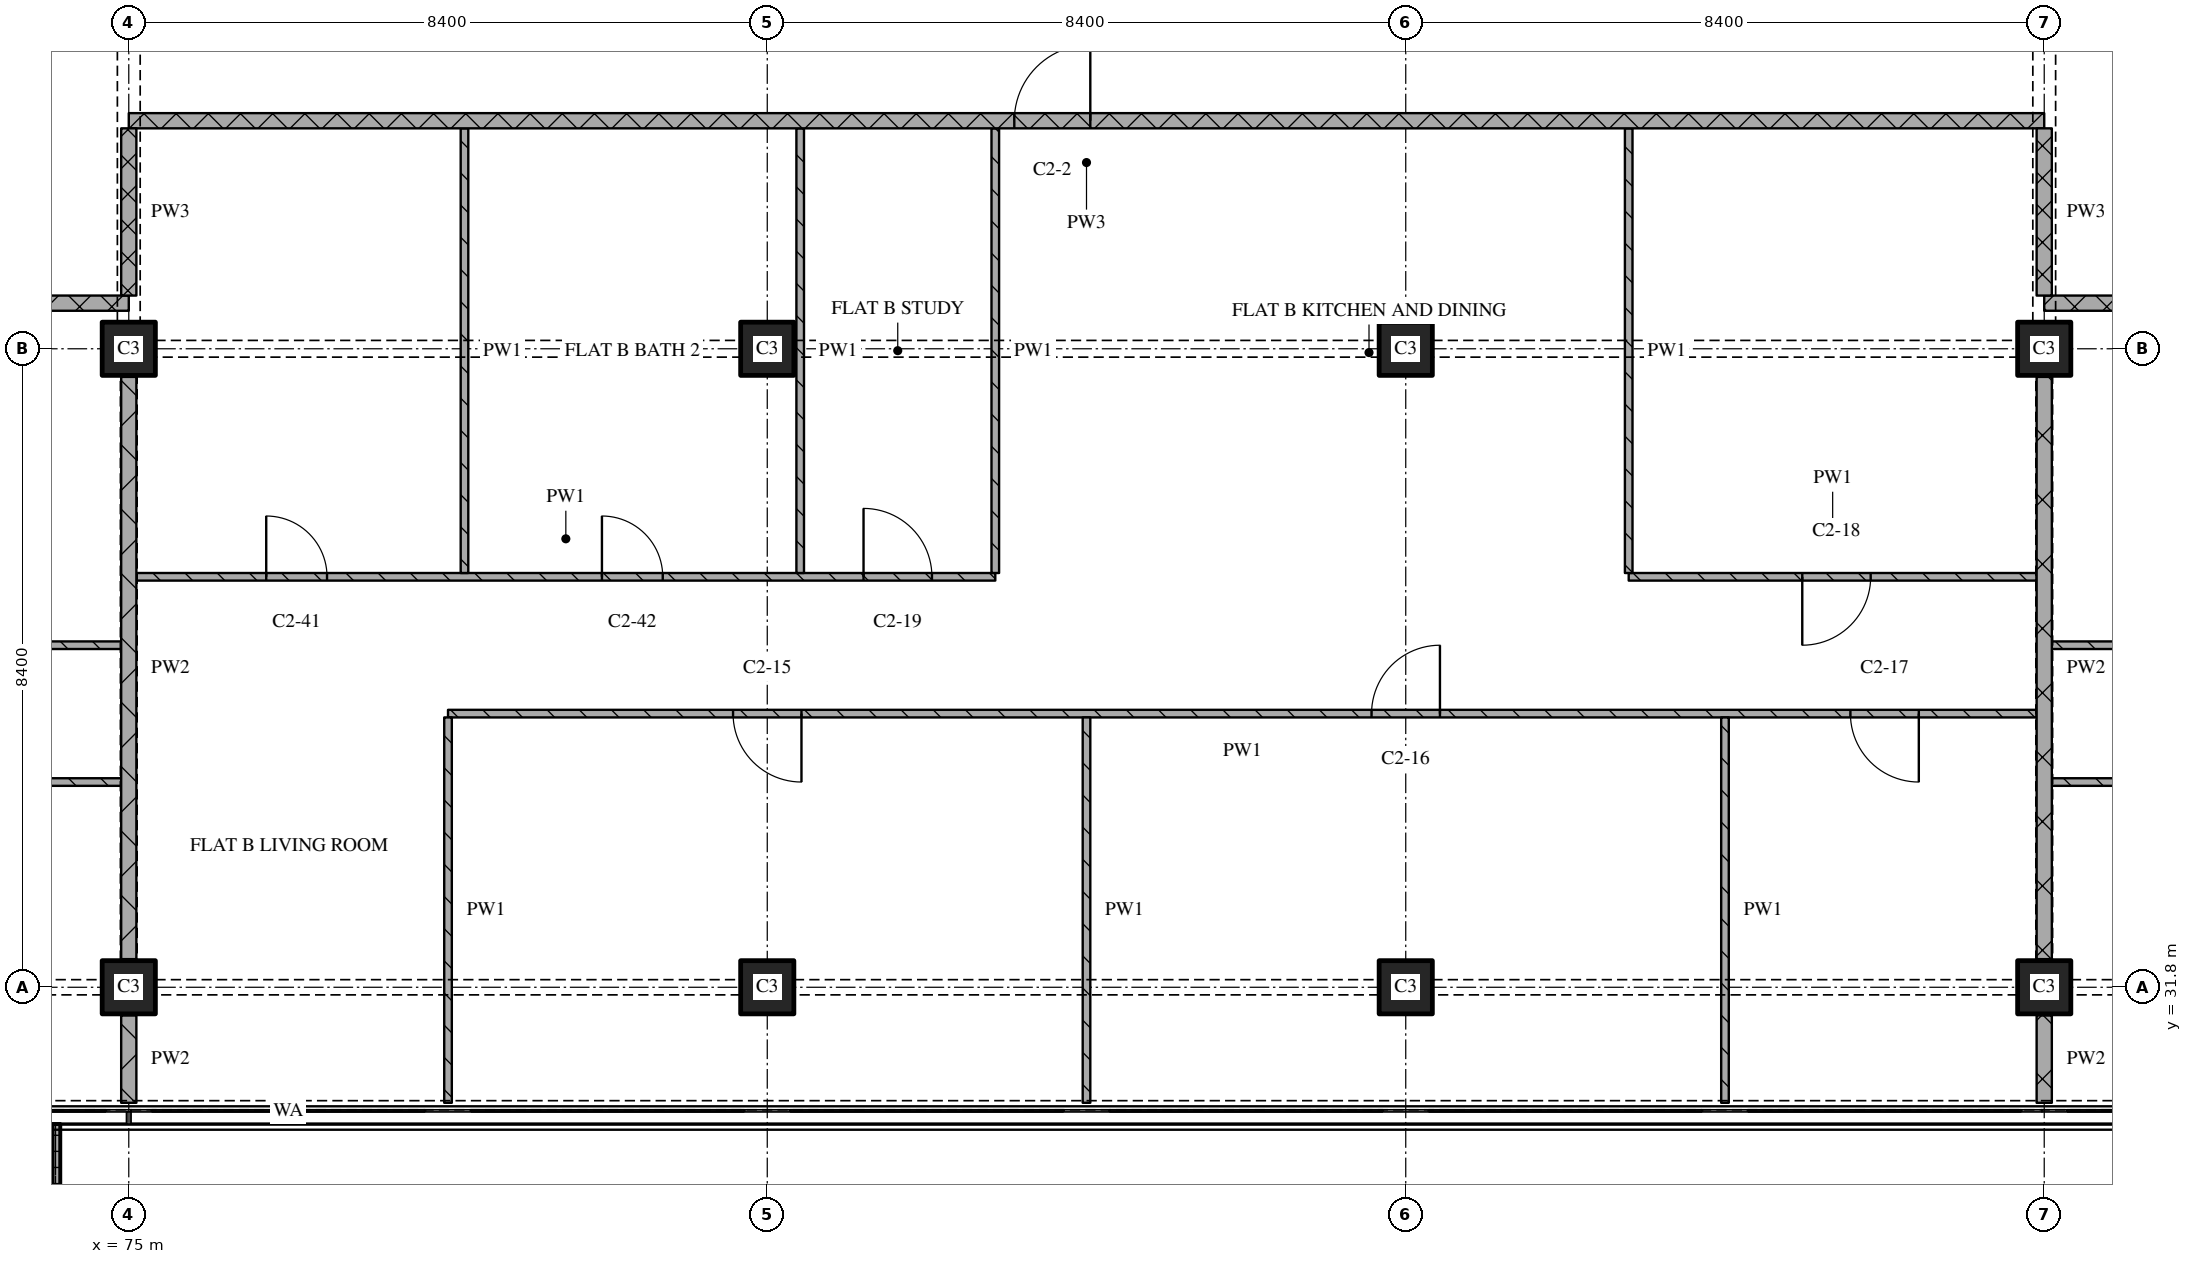
"""IFC4 building model, lengths in metres.
Left out: names, types, materials, properties, quantities, classifications, styles, units other than length and angle.
Written with IfcOpenShell. Run it as: python <this file> out.ifc"""

import sys

from ifc_helpers import new_model, si_unit, direction, frame, frame_2d, origin, origin_2d, place, context, subcontext, project, spatial, polyline, rectangle, outline, extrude, element, fill, save


model = new_model("IFC4")
c1 = context("Model", 3, precision=1e-05, world=origin(), true_north=direction((0.0, 1.0)))
c2 = subcontext(c1, "Body", "Model", "MODEL_VIEW")
j1 = project(units=[si_unit("LENGTHUNIT", "METRE"), si_unit("PLANEANGLEUNIT", "RADIAN")], contexts=[c1])
p1 = place(None, origin())
s1 = spatial("IfcSite", under=j1, at=p1, CompositionType="ELEMENT")
p2 = place(p1, origin())
s2 = spatial("IfcBuilding", under=s1, at=p2, CompositionType="ELEMENT")
p3 = place(p2, frame((0.0, 0.0, 161.85)))
s3 = spatial("IfcBuildingStorey", under=s2, at=p3, CompositionType="ELEMENT", Elevation=161.85)
for number, where, z_axis, x_axis in (
    (1, (75.0, 31.8, 0.0), (0.0, 0.0, 1.0), (1.0, 0.0, 0.0)),
    (2, (75.0, 40.2, 0.0), (0.0, 0.0, 1.0), (1.0, 0.0, 0.0)),
    (3, (83.4, 31.8, 0.0), (0.0, 0.0, 1.0), (1.0, 0.0, 0.0)),
    (4, (83.4, 40.2, 0.0), (0.0, 0.0, 1.0), (1.0, 0.0, 0.0)),
    (5, (91.8, 31.8, 0.0), (0.0, 0.0, 1.0), (1.0, 0.0, 0.0)),
    (6, (91.8, 40.2, 0.0), (0.0, 0.0, 1.0), (1.0, 0.0, 0.0)),
    (7, (100.2, 31.8, 0.0), (0.0, 0.0, 1.0), (1.0, 0.0, 0.0)),
    (8, (100.2, 40.2, 0.0), (0.0, 0.0, 1.0), (1.0, 0.0, 0.0)),
):
    element("IfcColumn", number, at=place(p3, frame(where, z_axis=z_axis, x_axis=x_axis)), inside=s3, PredefinedType="COLUMN", context=c2, shape_type="SweptSolid", body=[
        extrude(rectangle(XDim=0.7, YDim=0.7, at=origin_2d()), origin(), (0.0, 0.0, 1.0), 3.6),
    ])
p4 = place(p3, origin())
e9 = element("IfcWall", 9, at=p4, inside=s3, PredefinedType="SOLIDWALL", context=c2, shape_type="SweptSolid", body=[
    extrude(outline(polyline([(71.7, 30.0), (71.8, 30.0), (71.8, 28.5), (74.0, 28.5), (74.0, 30.0), (74.1, 30.0), (74.1, 28.4), (71.7, 28.4), (71.7, 30.0)])), origin(), (0.0, 0.0, 1.0), 1.0),
])
p5 = place(p3, frame((74.9, 34.5, 0.0), z_axis=(0.0, 0.0, 1.0), x_axis=(-1.0, 0.0, 0.0)))
e10 = element("IfcWall", 10, at=p5, inside=s3, PredefinedType="PARTITIONING", context=c2, shape_type="SweptSolid", body=[
    extrude(rectangle(XDim=16.7, YDim=0.1, at=frame_2d((8.35, 0.0))), origin(), (0.0, 0.0, 1.0), 3.32),
])
p6 = place(p5, frame((1.55, 0.0, 0.0)))
e11 = element("IfcOpeningElement", 11, at=p6, cuts=e10, PredefinedType="OPENING", context=c2, shape_type="SweptSolid", body=[
    extrude(rectangle(XDim=0.9, YDim=2.1, at=frame_2d((0.45, 1.05))), frame((0.0, 0.06, 0.0), z_axis=(0.0, -1.0, 0.0), x_axis=(1.0, 0.0, 0.0)), (0.0, 0.0, 1.0), 0.12),
])
p7 = place(p5, frame((7.85, 0.0, 0.0)))
e12 = element("IfcOpeningElement", 12, at=p7, cuts=e10, PredefinedType="OPENING", context=c2, shape_type="SweptSolid", body=[
    extrude(rectangle(XDim=0.9, YDim=2.1, at=frame_2d((0.45, 1.05))), frame((0.0, 0.06, 0.0), z_axis=(0.0, -1.0, 0.0), x_axis=(1.0, 0.0, 0.0)), (0.0, 0.0, 1.0), 0.12),
])
p8 = place(p5, frame((14.15, 0.0, 0.0)))
e13 = element("IfcOpeningElement", 13, at=p8, cuts=e10, PredefinedType="OPENING", context=c2, shape_type="SweptSolid", body=[
    extrude(rectangle(XDim=0.9, YDim=2.1, at=frame_2d((0.45, 1.05))), frame((0.0, 0.06, 0.0), z_axis=(0.0, -1.0, 0.0), x_axis=(1.0, 0.0, 0.0)), (0.0, 0.0, 1.0), 0.12),
])
p9 = place(p3, frame((117.0, 34.5, 0.0), z_axis=(0.0, 0.0, 1.0), x_axis=(-1.0, 0.0, 0.0)))
e14 = element("IfcWall", 14, at=p9, inside=s3, PredefinedType="PARTITIONING", context=c2, shape_type="SweptSolid", body=[
    extrude(rectangle(XDim=16.7, YDim=0.1, at=frame_2d((8.35, 0.0))), origin(), (0.0, 0.0, 1.0), 3.32),
])
p10 = place(p9, frame((12.15, 0.0, 0.0)))
e15 = element("IfcOpeningElement", 15, at=p10, cuts=e14, PredefinedType="OPENING", context=c2, shape_type="SweptSolid", body=[
    extrude(rectangle(XDim=0.9, YDim=2.1, at=frame_2d((0.45, 1.05))), frame((0.0, 0.06, 0.0), z_axis=(0.0, -1.0, 0.0), x_axis=(1.0, 0.0, 0.0)), (0.0, 0.0, 1.0), 0.12),
])
p11 = place(p3, frame((100.1, 35.4, 0.0), z_axis=(0.0, 0.0, 1.0), x_axis=(-1.0, 0.0, 0.0)))
e16 = element("IfcWall", 16, at=p11, inside=s3, PredefinedType="PARTITIONING", context=c2, shape_type="SweptSolid", body=[
    extrude(rectangle(XDim=20.9, YDim=0.1, at=frame_2d((10.45, 0.0))), origin(), (0.0, 0.0, 1.0), 3.32),
])
p12 = place(p11, frame((1.55, 0.0, 0.0)))
e17 = element("IfcOpeningElement", 17, at=p12, cuts=e16, PredefinedType="OPENING", context=c2, shape_type="SweptSolid", body=[
    extrude(rectangle(XDim=0.9, YDim=2.1, at=frame_2d((0.45, 1.05))), frame((0.0, 0.06, 0.0), z_axis=(0.0, -1.0, 0.0), x_axis=(1.0, 0.0, 0.0)), (0.0, 0.0, 1.0), 0.12),
])
p13 = place(p11, frame((7.85, 0.0, 0.0)))
e18 = element("IfcOpeningElement", 18, at=p13, cuts=e16, PredefinedType="OPENING", context=c2, shape_type="SweptSolid", body=[
    extrude(rectangle(XDim=0.9, YDim=2.1, at=frame_2d((0.45, 1.05))), frame((0.0, 0.06, 0.0), z_axis=(0.0, -1.0, 0.0), x_axis=(1.0, 0.0, 0.0)), (0.0, 0.0, 1.0), 0.12),
])
p14 = place(p11, frame((16.25, 0.0, 0.0)))
e19 = element("IfcOpeningElement", 19, at=p14, cuts=e16, PredefinedType="OPENING", context=c2, shape_type="SweptSolid", body=[
    extrude(rectangle(XDim=0.9, YDim=2.1, at=frame_2d((0.45, 1.05))), frame((0.0, 0.06, 0.0), z_axis=(0.0, -1.0, 0.0), x_axis=(1.0, 0.0, 0.0)), (0.0, 0.0, 1.0), 0.12),
])
p15 = place(p3, frame((66.3, 36.3, 0.0), z_axis=(0.0, 0.0, 1.0), x_axis=(1.0, 0.0, 0.0)))
e20 = element("IfcWall", 20, at=p15, inside=s3, PredefinedType="PARTITIONING", context=c2, shape_type="SweptSolid", body=[
    extrude(rectangle(XDim=8.6, YDim=0.1, at=frame_2d((4.3, 0.0))), origin(), (0.0, 0.0, 1.0), 3.32),
])
p16 = place(p15, frame((6.2, 0.0, 0.0)))
e21 = element("IfcOpeningElement", 21, at=p16, cuts=e20, PredefinedType="OPENING", context=c2, shape_type="SweptSolid", body=[
    extrude(rectangle(XDim=0.8, YDim=2.1, at=frame_2d((0.4, 1.05))), frame((0.0, 0.06, 0.0), z_axis=(0.0, -1.0, 0.0), x_axis=(1.0, 0.0, 0.0)), (0.0, 0.0, 1.0), 0.12),
])
p17 = place(p3, frame((100.3, 36.3, 0.0), z_axis=(0.0, 0.0, 1.0), x_axis=(1.0, 0.0, 0.0)))
e22 = element("IfcWall", 22, at=p17, inside=s3, PredefinedType="PARTITIONING", context=c2, shape_type="SweptSolid", body=[
    extrude(rectangle(XDim=12.2, YDim=0.1, at=frame_2d((6.1, 0.0))), origin(), (0.0, 0.0, 1.0), 3.32),
])
p18 = place(p17, frame((1.75, 0.0, 0.0)))
e23 = element("IfcOpeningElement", 23, at=p18, cuts=e22, PredefinedType="OPENING", context=c2, shape_type="SweptSolid", body=[
    extrude(rectangle(XDim=0.8, YDim=2.1, at=frame_2d((0.4, 1.05))), frame((0.0, 0.06, 0.0), z_axis=(0.0, -1.0, 0.0), x_axis=(1.0, 0.0, 0.0)), (0.0, 0.0, 1.0), 0.12),
])
p19 = place(p17, frame((6.25, 0.0, 0.0)))
e24 = element("IfcOpeningElement", 24, at=p19, cuts=e22, PredefinedType="OPENING", context=c2, shape_type="SweptSolid", body=[
    extrude(rectangle(XDim=0.8, YDim=2.1, at=frame_2d((0.4, 1.05))), frame((0.0, 0.06, 0.0), z_axis=(0.0, -1.0, 0.0), x_axis=(1.0, 0.0, 0.0)), (0.0, 0.0, 1.0), 0.12),
])
p20 = place(p3, frame((75.1, 37.2, 0.0), z_axis=(0.0, 0.0, 1.0), x_axis=(1.0, 0.0, 0.0)))
e25 = element("IfcWall", 25, at=p20, inside=s3, PredefinedType="PARTITIONING", context=c2, shape_type="SweptSolid", body=[
    extrude(rectangle(XDim=11.3, YDim=0.1, at=frame_2d((5.65, 0.0))), origin(), (0.0, 0.0, 1.0), 3.32),
])
p21 = place(p20, frame((1.708, 0.0, 0.0)))
e26 = element("IfcOpeningElement", 26, at=p21, cuts=e25, PredefinedType="OPENING", context=c2, shape_type="SweptSolid", body=[
    extrude(rectangle(XDim=0.8, YDim=2.1, at=frame_2d((0.4, 1.05))), frame((0.0, 0.06, 0.0), z_axis=(0.0, -1.0, 0.0), x_axis=(1.0, 0.0, 0.0)), (0.0, 0.0, 1.0), 0.12),
])
p22 = place(p20, frame((6.125, 0.0, 0.0)))
e27 = element("IfcOpeningElement", 27, at=p22, cuts=e25, PredefinedType="OPENING", context=c2, shape_type="SweptSolid", body=[
    extrude(rectangle(XDim=0.8, YDim=2.1, at=frame_2d((0.4, 1.05))), frame((0.0, 0.06, 0.0), z_axis=(0.0, -1.0, 0.0), x_axis=(1.0, 0.0, 0.0)), (0.0, 0.0, 1.0), 0.12),
])
p23 = place(p20, frame((9.567, 0.0, 0.0)))
e28 = element("IfcOpeningElement", 28, at=p23, cuts=e25, PredefinedType="OPENING", context=c2, shape_type="SweptSolid", body=[
    extrude(rectangle(XDim=0.9, YDim=2.1, at=frame_2d((0.45, 1.05))), frame((0.0, 0.06, 0.0), z_axis=(0.0, -1.0, 0.0), x_axis=(1.0, 0.0, 0.0)), (0.0, 0.0, 1.0), 0.12),
])
p24 = place(p3, frame((94.733, 37.2, 0.0), z_axis=(0.0, 0.0, 1.0), x_axis=(1.0, 0.0, 0.0)))
e29 = element("IfcWall", 29, at=p24, inside=s3, PredefinedType="PARTITIONING", context=c2, shape_type="SweptSolid", body=[
    extrude(rectangle(XDim=5.367, YDim=0.1, at=frame_2d((2.683, 0.0))), origin(), (0.0, 0.0, 1.0), 3.32),
])
p25 = place(p24, frame((2.283, 0.0, 0.0)))
e30 = element("IfcOpeningElement", 30, at=p25, cuts=e29, PredefinedType="OPENING", context=c2, shape_type="SweptSolid", body=[
    extrude(rectangle(XDim=0.9, YDim=2.1, at=frame_2d((0.45, 1.05))), frame((0.0, 0.06, 0.0), z_axis=(0.0, -1.0, 0.0), x_axis=(1.0, 0.0, 0.0)), (0.0, 0.0, 1.0), 0.12),
])
p26 = place(p3, frame((75.0, 40.8, 0.0), z_axis=(0.0, 0.0, 1.0), x_axis=(-1.0, 0.0, 0.0)))
e31 = element("IfcWall", 31, at=p26, inside=s3, PredefinedType="PARTITIONING", context=c2, shape_type="SweptSolid", body=[
    extrude(rectangle(XDim=24.28, YDim=0.2, at=frame_2d((12.14, 0.0))), origin(), (0.0, 0.0, 1.0), 3.32),
])
p27 = place(p26, frame((8.95, 0.0, 0.0)))
e32 = element("IfcOpeningElement", 32, at=p27, cuts=e31, PredefinedType="OPENING", context=c2, shape_type="SweptSolid", body=[
    extrude(rectangle(XDim=1.0, YDim=2.1, at=frame_2d((0.5, 1.05))), frame((0.0, 0.11, 0.0), z_axis=(0.0, -1.0, 0.0), x_axis=(1.0, 0.0, 0.0)), (0.0, 0.0, 1.0), 0.22),
])
p28 = place(p3, frame((124.48, 40.8, 0.0), z_axis=(0.0, 0.0, 1.0), x_axis=(-1.0, 0.0, 0.0)))
e33 = element("IfcWall", 33, at=p28, inside=s3, PredefinedType="PARTITIONING", context=c2, shape_type="SweptSolid", body=[
    extrude(rectangle(XDim=24.28, YDim=0.2, at=frame_2d((12.14, 0.0))), origin(), (0.0, 0.0, 1.0), 3.32),
])
p29 = place(p28, frame((10.73, 0.0, 0.0)))
e34 = element("IfcOpeningElement", 34, at=p29, cuts=e33, PredefinedType="OPENING", context=c2, shape_type="SweptSolid", body=[
    extrude(rectangle(XDim=1.0, YDim=2.1, at=frame_2d((0.5, 1.05))), frame((0.0, 0.11, 0.0), z_axis=(0.0, -1.0, 0.0), x_axis=(1.0, 0.0, 0.0)), (0.0, 0.0, 1.0), 0.22),
])
p30 = place(p3, frame((100.2, 43.2, 0.0), z_axis=(0.0, 0.0, 1.0), x_axis=(-1.0, 0.0, 0.0)))
e35 = element("IfcWall", 35, at=p30, inside=s3, PredefinedType="PARTITIONING", context=c2, shape_type="SweptSolid", body=[
    extrude(rectangle(XDim=25.2, YDim=0.2, at=frame_2d((12.6, 0.0))), origin(), (0.0, 0.0, 1.0), 3.32),
])
p31 = place(p30, frame((12.55, 0.0, 0.0)))
e36 = element("IfcOpeningElement", 36, at=p31, cuts=e35, PredefinedType="OPENING", context=c2, shape_type="SweptSolid", body=[
    extrude(rectangle(XDim=1.0, YDim=2.1, at=frame_2d((0.5, 1.05))), frame((0.0, 0.11, 0.0), z_axis=(0.0, -1.0, 0.0), x_axis=(1.0, 0.0, 0.0)), (0.0, 0.0, 1.0), 0.22),
])
p32 = place(p3, frame((75.0, 43.1, 0.0), z_axis=(0.0, 0.0, 1.0), x_axis=(0.0, -1.0, 0.0)))
e37 = element("IfcWall", 37, at=p32, inside=s3, PredefinedType="PARTITIONING", context=c2, shape_type="SweptSolid", body=[
    extrude(rectangle(XDim=2.2, YDim=0.2, at=frame_2d((1.1, 0.0))), origin(), (0.0, 0.0, 1.0), 2.43),
])
p33 = place(p3, frame((75.0, 31.43, 0.0), z_axis=(0.0, 0.0, 1.0), x_axis=(0.0, -1.0, 0.0)))
e38 = element("IfcWall", 38, at=p33, inside=s3, PredefinedType="PARTITIONING", context=c2, shape_type="SweptSolid", body=[
    extrude(rectangle(XDim=1.15, YDim=0.2, at=frame_2d((0.575, 0.0))), origin(), (0.0, 0.0, 1.0), 3.32),
])
p34 = place(p3, frame((75.0, 39.83, 0.0), z_axis=(0.0, 0.0, 1.0), x_axis=(0.0, -1.0, 0.0)))
e39 = element("IfcWall", 39, at=p34, inside=s3, PredefinedType="PARTITIONING", context=c2, shape_type="SweptSolid", body=[
    extrude(rectangle(XDim=7.66, YDim=0.2, at=frame_2d((3.83, 0.0))), origin(), (0.0, 0.0, 1.0), 2.72),
])
p35 = place(p3, frame((79.2, 35.35, 0.0), z_axis=(0.0, 0.0, 1.0), x_axis=(0.0, -1.0, 0.0)))
e40 = element("IfcWall", 40, at=p35, inside=s3, PredefinedType="PARTITIONING", context=c2, shape_type="SweptSolid", body=[
    extrude(rectangle(XDim=5.07, YDim=0.1, at=frame_2d((2.535, 0.0))), origin(), (0.0, 0.0, 1.0), 3.32),
])
for number, where, z_axis, x_axis in (
    (41, (79.417, 43.1, 0.0), (0.0, 0.0, 1.0), (0.0, -1.0, 0.0)),
    (42, (83.833, 43.1, 0.0), (0.0, 0.0, 1.0), (0.0, -1.0, 0.0)),
    (43, (86.4, 43.1, 0.0), (0.0, 0.0, 1.0), (0.0, -1.0, 0.0)),
):
    element("IfcWall", number, at=place(p3, frame(where, z_axis=z_axis, x_axis=x_axis)), inside=s3, PredefinedType="PARTITIONING", context=c2, shape_type="SweptSolid", body=[
        extrude(rectangle(XDim=5.85, YDim=0.1, at=frame_2d((2.925, 0.0))), origin(), (0.0, 0.0, 1.0), 3.32),
    ])
p36 = place(p3, frame((87.6, 35.35, 0.0), z_axis=(0.0, 0.0, 1.0), x_axis=(0.0, -1.0, 0.0)))
e44 = element("IfcWall", 44, at=p36, inside=s3, PredefinedType="PARTITIONING", context=c2, shape_type="SweptSolid", body=[
    extrude(rectangle(XDim=5.07, YDim=0.1, at=frame_2d((2.535, 0.0))), origin(), (0.0, 0.0, 1.0), 3.32),
])
p37 = place(p3, frame((94.733, 43.1, 0.0), z_axis=(0.0, 0.0, 1.0), x_axis=(0.0, -1.0, 0.0)))
e45 = element("IfcWall", 45, at=p37, inside=s3, PredefinedType="PARTITIONING", context=c2, shape_type="SweptSolid", body=[
    extrude(rectangle(XDim=5.85, YDim=0.1, at=frame_2d((2.925, 0.0))), origin(), (0.0, 0.0, 1.0), 3.32),
])
p38 = place(p3, frame((96.0, 35.35, 0.0), z_axis=(0.0, 0.0, 1.0), x_axis=(0.0, -1.0, 0.0)))
e46 = element("IfcWall", 46, at=p38, inside=s3, PredefinedType="PARTITIONING", context=c2, shape_type="SweptSolid", body=[
    extrude(rectangle(XDim=5.07, YDim=0.1, at=frame_2d((2.535, 0.0))), origin(), (0.0, 0.0, 1.0), 3.32),
])
p39 = place(p3, frame((100.2, 43.1, 0.0), z_axis=(0.0, 0.0, 1.0), x_axis=(0.0, -1.0, 0.0)))
e47 = element("IfcWall", 47, at=p39, inside=s3, PredefinedType="PARTITIONING", context=c2, shape_type="SweptSolid", body=[
    extrude(rectangle(XDim=2.2, YDim=0.2, at=frame_2d((1.1, 0.0))), origin(), (0.0, 0.0, 1.0), 2.43),
])
p40 = place(p3, frame((100.2, 31.43, 0.0), z_axis=(0.0, 0.0, 1.0), x_axis=(0.0, -1.0, 0.0)))
e48 = element("IfcWall", 48, at=p40, inside=s3, PredefinedType="PARTITIONING", context=c2, shape_type="SweptSolid", body=[
    extrude(rectangle(XDim=1.15, YDim=0.2, at=frame_2d((0.575, 0.0))), origin(), (0.0, 0.0, 1.0), 3.32),
])
p41 = place(p3, frame((100.2, 39.83, 0.0), z_axis=(0.0, 0.0, 1.0), x_axis=(0.0, -1.0, 0.0)))
e49 = element("IfcWall", 49, at=p41, inside=s3, PredefinedType="PARTITIONING", context=c2, shape_type="SweptSolid", body=[
    extrude(rectangle(XDim=7.66, YDim=0.2, at=frame_2d((3.83, 0.0))), origin(), (0.0, 0.0, 1.0), 2.72),
])
p42 = place(p12, origin())
e50 = element("IfcDoor", 50, at=p42, inside=s3, OperationType="SINGLE_SWING_LEFT", PredefinedType="DOOR", context=c2, shape_type="SweptSolid", body=[
    extrude(rectangle(XDim=0.9, YDim=2.1, at=frame_2d((0.45, 1.05))), frame((0.0, 0.025, 0.0), z_axis=(0.0, -1.0, 0.0), x_axis=(1.0, 0.0, 0.0)), (0.0, 0.0, 1.0), 0.05),
])
fill(e17, e50)
p43 = place(p13, origin())
e51 = element("IfcDoor", 51, at=p43, inside=s3, OperationType="SINGLE_SWING_RIGHT", PredefinedType="DOOR", context=c2, shape_type="SweptSolid", body=[
    extrude(rectangle(XDim=0.9, YDim=2.1, at=frame_2d((0.45, 1.05))), frame((0.0, 0.025, 0.0), z_axis=(0.0, -1.0, 0.0), x_axis=(1.0, 0.0, 0.0)), (0.0, 0.0, 1.0), 0.05),
])
fill(e18, e51)
p44 = place(p14, origin())
e52 = element("IfcDoor", 52, at=p44, inside=s3, OperationType="SINGLE_SWING_LEFT", PredefinedType="DOOR", context=c2, shape_type="SweptSolid", body=[
    extrude(rectangle(XDim=0.9, YDim=2.1, at=frame_2d((0.45, 1.05))), frame((0.0, 0.025, 0.0), z_axis=(0.0, -1.0, 0.0), x_axis=(1.0, 0.0, 0.0)), (0.0, 0.0, 1.0), 0.05),
])
fill(e19, e52)
p45 = place(p21, origin())
e53 = element("IfcDoor", 53, at=p45, inside=s3, OperationType="SINGLE_SWING_LEFT", PredefinedType="DOOR", context=c2, shape_type="SweptSolid", body=[
    extrude(rectangle(XDim=0.8, YDim=2.1, at=frame_2d((0.4, 1.05))), frame((0.0, 0.025, 0.0), z_axis=(0.0, -1.0, 0.0), x_axis=(1.0, 0.0, 0.0)), (0.0, 0.0, 1.0), 0.05),
])
fill(e26, e53)
p46 = place(p22, origin())
e54 = element("IfcDoor", 54, at=p46, inside=s3, OperationType="SINGLE_SWING_LEFT", PredefinedType="DOOR", context=c2, shape_type="SweptSolid", body=[
    extrude(rectangle(XDim=0.8, YDim=2.1, at=frame_2d((0.4, 1.05))), frame((0.0, 0.025, 0.0), z_axis=(0.0, -1.0, 0.0), x_axis=(1.0, 0.0, 0.0)), (0.0, 0.0, 1.0), 0.05),
])
fill(e27, e54)
p47 = place(p23, origin())
e55 = element("IfcDoor", 55, at=p47, inside=s3, OperationType="SINGLE_SWING_LEFT", PredefinedType="DOOR", context=c2, shape_type="SweptSolid", body=[
    extrude(rectangle(XDim=0.9, YDim=2.1, at=frame_2d((0.45, 1.05))), frame((0.0, 0.025, 0.0), z_axis=(0.0, -1.0, 0.0), x_axis=(1.0, 0.0, 0.0)), (0.0, 0.0, 1.0), 0.05),
])
fill(e28, e55)
p48 = place(p25, origin())
e56 = element("IfcDoor", 56, at=p48, inside=s3, OperationType="SINGLE_SWING_RIGHT", PredefinedType="DOOR", context=c2, shape_type="SweptSolid", body=[
    extrude(rectangle(XDim=0.9, YDim=2.1, at=frame_2d((0.45, 1.05))), frame((0.0, 0.025, 0.0), z_axis=(0.0, -1.0, 0.0), x_axis=(1.0, 0.0, 0.0)), (0.0, 0.0, 1.0), 0.05),
])
fill(e30, e56)
p49 = place(p31, origin())
e57 = element("IfcDoor", 57, at=p49, inside=s3, OperationType="SINGLE_SWING_RIGHT", PredefinedType="DOOR", context=c2, shape_type="SweptSolid", body=[
    extrude(rectangle(XDim=1.0, YDim=2.1, at=frame_2d((0.5, 1.05))), frame((0.0, 0.025, 0.0), z_axis=(0.0, -1.0, 0.0), x_axis=(1.0, 0.0, 0.0)), (0.0, 0.0, 1.0), 0.05),
])
fill(e36, e57)
save(model, sys.argv[1])
